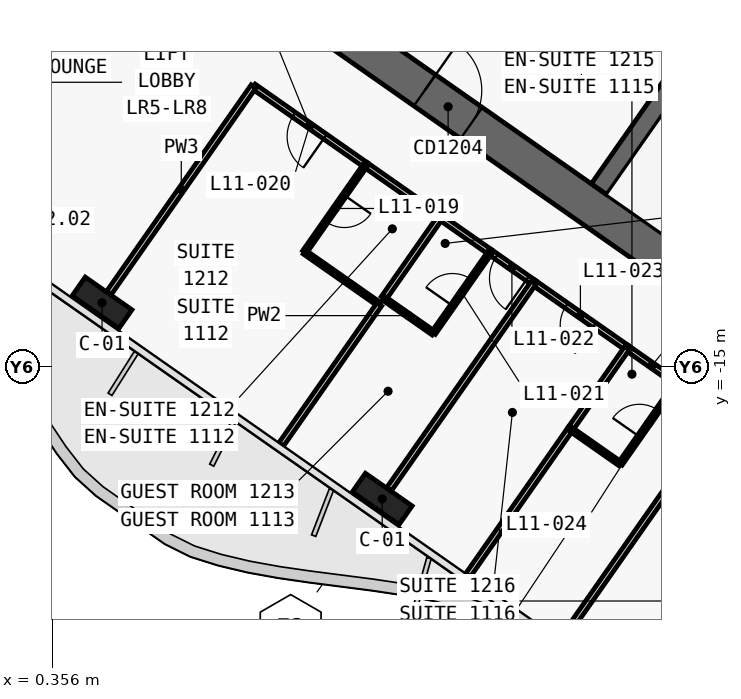
"""IFC4 building model, lengths in metres.
Left out: names, types, materials, properties, quantities, classifications, styles, units other than length and angle.
Written with IfcOpenShell. Run it as: python <this file> out.ifc"""

import sys

from ifc_helpers import new_model, si_unit, direction, frame, frame_2d, origin, origin_2d, place, context, subcontext, project, spatial, polyline, rectangle, outline, extrude, element, fill, save


model = new_model("IFC4")
c1 = context("Model", 3, precision=1e-05, world=origin(), true_north=direction((0.0, 1.0)))
c2 = subcontext(c1, "Body", "Model", "MODEL_VIEW")
j1 = project(units=[si_unit("LENGTHUNIT", "METRE"), si_unit("PLANEANGLEUNIT", "RADIAN")], contexts=[c1])
p1 = place(None, origin())
s1 = spatial("IfcSite", under=j1, at=p1, CompositionType="ELEMENT")
p2 = place(p1, origin())
s2 = spatial("IfcBuilding", under=s1, at=p2, CompositionType="ELEMENT")
p3 = place(p2, frame((0.0, 0.0, 65.3)))
s3 = spatial("IfcBuildingStorey", under=s2, at=p3, CompositionType="ELEMENT", Elevation=65.3)
p4 = place(p3, frame((-0.037, 11.867, 0.0), z_axis=(0.0, 0.0, 1.0), x_axis=(0.819155306259, -0.573571777746, 0.0)))
e1 = element("IfcWall", 1, at=p4, inside=s3, PredefinedType="SHEAR", context=c2, shape_type="SweptSolid", body=[
    extrude(outline(polyline([(33.837, 0.5), (0.0, 0.5), (0.7, -0.5), (33.837, -0.5), (33.837, 0.5)])), origin(), (0.0, 0.0, 1.0), 3.6),
])
p5 = place(p3, frame((-0.037, -0.585, 0.0), z_axis=(0.0, 0.0, 1.0), x_axis=(0.819157152511, -0.573569140985, 0.0)))
e2 = element("IfcWall", 2, at=p5, inside=s3, PredefinedType="SHEAR", context=c2, shape_type="SweptSolid", body=[
    extrude(outline(polyline([(26.695, 0.5), (0.0, 0.5), (0.7, -0.5), (26.695, -0.5), (26.695, 0.5)])), origin(), (0.0, 0.0, 1.0), 3.6),
])
p6 = place(p5, frame((1.245, 0.0, 0.0)))
e3 = element("IfcOpeningElement", 3, at=p6, cuts=e2, PredefinedType="OPENING", context=c2, shape_type="SweptSolid", body=[
    extrude(rectangle(XDim=1.5, YDim=2.1, at=frame_2d((0.75, 1.05))), frame((0.0, 0.51, 0.0), z_axis=(0.0, -1.0, 0.0), x_axis=(1.0, 0.0, 0.0)), (0.0, 0.0, 1.0), 1.02),
])
p7 = place(p5, frame((12.445, 0.0, 0.0)))
e4 = element("IfcOpeningElement", 4, at=p7, cuts=e2, PredefinedType="OPENING", context=c2, shape_type="SweptSolid", body=[
    extrude(rectangle(XDim=1.5, YDim=2.1, at=frame_2d((0.75, 1.05))), frame((0.0, 0.51, 0.0), z_axis=(0.0, -1.0, 0.0), x_axis=(1.0, 0.0, 0.0)), (0.0, 0.0, 1.0), 1.02),
])
p8 = place(p3, frame((14.745, -10.324, 0.0), z_axis=(0.0, 0.0, 1.0), x_axis=(0.57356780395, 0.819158088694, 0.0)))
e5 = element("IfcWall", 5, at=p8, inside=s3, PredefinedType="SHEAR", context=c2, shape_type="SweptSolid", body=[
    extrude(outline(polyline([(0.0, 0.25), (0.0, -0.25), (4.35, -0.25), (4.35, 0.25), (0.0, 0.25)])), origin(), (0.0, 0.0, 1.0), 3.6),
])
p9 = place(p3, frame((2.638, 3.768, 0.0), z_axis=(0.0, 0.0, 1.0), x_axis=(0.819148977158, -0.573580816643, 0.0)))
e6 = element("IfcWall", 6, at=p9, inside=s3, PredefinedType="SHEAR", context=c2, shape_type="SweptSolid", body=[
    extrude(outline(polyline([(0.0, 0.25), (0.0, -0.25), (26.0, -0.25), (26.0, 0.25), (0.0, 0.25)])), origin(), (0.0, 0.0, 1.0), 3.6),
])
p10 = place(p9, frame((9.637, 0.0, 0.0)))
e7 = element("IfcOpeningElement", 7, at=p10, cuts=e6, PredefinedType="OPENING", context=c2, shape_type="SweptSolid", body=[
    extrude(rectangle(XDim=1.2, YDim=2.1, at=frame_2d((0.6, 1.05))), frame((0.0, 0.26, 0.0), z_axis=(0.0, -1.0, 0.0), x_axis=(1.0, 0.0, 0.0)), (0.0, 0.0, 1.0), 0.52),
])
p11 = place(p9, frame((11.812, 0.0, 0.0)))
e8 = element("IfcOpeningElement", 8, at=p11, cuts=e6, PredefinedType="OPENING", context=c2, shape_type="SweptSolid", body=[
    extrude(rectangle(XDim=1.2, YDim=2.1, at=frame_2d((0.6, 1.05))), frame((0.0, 0.26, 0.0), z_axis=(0.0, -1.0, 0.0), x_axis=(1.0, 0.0, 0.0)), (0.0, 0.0, 1.0), 0.52),
])
p12 = place(p9, frame((13.988, 0.0, 0.0)))
e9 = element("IfcOpeningElement", 9, at=p12, cuts=e6, PredefinedType="OPENING", context=c2, shape_type="SweptSolid", body=[
    extrude(rectangle(XDim=1.2, YDim=2.1, at=frame_2d((0.6, 1.05))), frame((0.0, 0.26, 0.0), z_axis=(0.0, -1.0, 0.0), x_axis=(1.0, 0.0, 0.0)), (0.0, 0.0, 1.0), 0.52),
])
p13 = place(p9, frame((16.262, 0.0, 0.0)))
e10 = element("IfcOpeningElement", 10, at=p13, cuts=e6, PredefinedType="OPENING", context=c2, shape_type="SweptSolid", body=[
    extrude(rectangle(XDim=1.0, YDim=2.1, at=frame_2d((0.5, 1.05))), frame((0.0, 0.26, 0.0), z_axis=(0.0, -1.0, 0.0), x_axis=(1.0, 0.0, 0.0)), (0.0, 0.0, 1.0), 0.52),
])
for number, where, z_axis, x_axis in (
    (11, (1.665, -13.313, 0.0), (0.0, 0.0, 1.0), (0.819, -0.574, 0.0)),
    (12, (9.038, -18.475, 0.0), (0.0, 0.0, 1.0), (0.819, -0.574, 0.0)),
):
    element("IfcColumn", number, at=place(p3, frame(where, z_axis=z_axis, x_axis=x_axis)), inside=s3, PredefinedType="COLUMN", context=c2, shape_type="SweptSolid", body=[
        extrude(rectangle(XDim=1.5, YDim=0.6, at=origin_2d()), origin(), (0.0, 0.0, 1.0), 3.6),
    ])
p14 = place(p3, frame((8.601, -9.685, 0.0), z_axis=(0.0, 0.0, 1.0), x_axis=(-0.819149096931, 0.573580645591, 0.0)))
e13 = element("IfcWall", 13, at=p14, inside=s3, PredefinedType="PARTITIONING", context=c2, shape_type="SweptSolid", body=[
    extrude(rectangle(XDim=3.601, YDim=0.15, at=frame_2d((1.8, 0.0))), origin(), (0.0, 0.0, 1.0), 2.6),
])
p15 = place(p14, frame((1.301, 0.0, 0.0)))
e14 = element("IfcOpeningElement", 14, at=p15, cuts=e13, PredefinedType="OPENING", context=c2, shape_type="SweptSolid", body=[
    extrude(rectangle(XDim=1.0, YDim=2.1, at=frame_2d((0.5, 1.05))), frame((0.0, 0.085, 0.0), z_axis=(0.0, -1.0, 0.0), x_axis=(1.0, 0.0, 0.0)), (0.0, 0.0, 1.0), 0.17),
])
p16 = place(p3, frame((10.568, -11.062, 0.0), z_axis=(0.0, 0.0, 1.0), x_axis=(-0.819146032251, 0.573585022335, 0.0)))
e15 = element("IfcWall", 15, at=p16, inside=s3, PredefinedType="PARTITIONING", context=c2, shape_type="SweptSolid", body=[
    extrude(rectangle(XDim=2.404, YDim=0.15, at=frame_2d((1.202, 0.0))), origin(), (0.0, 0.0, 1.0), 3.32),
])
p17 = place(p3, frame((13.026, -12.783, 0.0), z_axis=(0.0, 0.0, 1.0), x_axis=(-0.81914197737, 0.573590813132, 0.0)))
e16 = element("IfcWall", 16, at=p17, inside=s3, PredefinedType="PARTITIONING", context=c2, shape_type="SweptSolid", body=[
    extrude(rectangle(XDim=1.403, YDim=0.15, at=frame_2d((0.701, 0.0))), origin(), (0.0, 0.0, 1.0), 2.6),
])
p18 = place(p17, frame((0.202, 0.0, 0.0)))
e17 = element("IfcOpeningElement", 17, at=p18, cuts=e16, PredefinedType="OPENING", context=c2, shape_type="SweptSolid", body=[
    extrude(rectangle(XDim=1.0, YDim=2.1, at=frame_2d((0.5, 1.05))), frame((0.0, 0.085, 0.0), z_axis=(0.0, -1.0, 0.0), x_axis=(1.0, 0.0, 0.0)), (0.0, 0.0, 1.0), 0.17),
])
p19 = place(p3, frame((11.879, -11.98, 0.0), z_axis=(0.0, 0.0, 1.0), x_axis=(-0.819189013667, 0.573523634986, 0.0)))
e18 = element("IfcWall", 18, at=p19, inside=s3, PredefinedType="PARTITIONING", context=c2, shape_type="SweptSolid", body=[
    extrude(rectangle(XDim=1.604, YDim=0.15, at=frame_2d((0.802, 0.0))), origin(), (0.0, 0.0, 1.0), 3.32),
])
p20 = place(p3, frame((15.483, -14.504, 0.0), z_axis=(0.0, 0.0, 1.0), x_axis=(-0.81916700466, 0.573555070134, 0.0)))
e19 = element("IfcWall", 19, at=p20, inside=s3, PredefinedType="PARTITIONING", context=c2, shape_type="SweptSolid", body=[
    extrude(rectangle(XDim=3.004, YDim=0.15, at=frame_2d((1.502, 0.0))), origin(), (0.0, 0.0, 1.0), 2.6),
])
p21 = place(p20, frame((1.052, 0.0, 0.0)))
e20 = element("IfcOpeningElement", 20, at=p21, cuts=e19, PredefinedType="OPENING", context=c2, shape_type="SweptSolid", body=[
    extrude(rectangle(XDim=0.9, YDim=2.1, at=frame_2d((0.45, 1.05))), frame((0.0, 0.085, 0.0), z_axis=(0.0, -1.0, 0.0), x_axis=(1.0, 0.0, 0.0)), (0.0, 0.0, 1.0), 0.17),
])
p22 = place(p3, frame((16.794, -15.421, 0.0), z_axis=(0.0, 0.0, 1.0), x_axis=(-0.819189013667, 0.573523634986, 0.0)))
e21 = element("IfcWall", 21, at=p22, inside=s3, PredefinedType="PARTITIONING", context=c2, shape_type="SweptSolid", body=[
    extrude(rectangle(XDim=1.604, YDim=0.15, at=frame_2d((0.802, 0.0))), origin(), (0.0, 0.0, 1.0), 3.32),
])
p23 = place(p3, frame((8.6, -9.684, 0.0), z_axis=(0.0, 0.0, 1.0), x_axis=(-0.573550118428, -0.819170471667, 0.0)))
e22 = element("IfcWall", 22, at=p23, inside=s3, PredefinedType="PARTITIONING", context=c2, shape_type="SweptSolid", body=[
    extrude(rectangle(XDim=2.8, YDim=0.12, at=frame_2d((1.4, 0.0))), origin(), (0.0, 0.0, 1.0), 3.32),
])
p24 = place(p23, frame((0.975, 0.0, 0.0)))
e23 = element("IfcOpeningElement", 23, at=p24, cuts=e22, PredefinedType="OPENING", context=c2, shape_type="SweptSolid", body=[
    extrude(rectangle(XDim=0.85, YDim=2.05, at=frame_2d((0.425, 1.025))), frame((0.0, 0.07, 0.0), z_axis=(0.0, -1.0, 0.0), x_axis=(1.0, 0.0, 0.0)), (0.0, 0.0, 1.0), 0.14),
])
p25 = place(p3, frame((6.994, -11.979, 0.0), z_axis=(0.0, 0.0, 1.0), x_axis=(0.819188907105, -0.573523787192, 0.0)))
e24 = element("IfcWall", 24, at=p25, inside=s3, PredefinedType="PARTITIONING", context=c2, shape_type="SweptSolid", body=[
    extrude(rectangle(XDim=2.4, YDim=0.12, at=frame_2d((1.2, 0.0))), origin(), (0.0, 0.0, 1.0), 3.32),
])
p26 = place(p3, frame((8.96, -13.355, 0.0), z_axis=(0.0, 0.0, 1.0), x_axis=(-0.573564311442, -0.819160534108, 0.0)))
e25 = element("IfcWall", 25, at=p26, inside=s3, PredefinedType="PARTITIONING", context=c2, shape_type="SweptSolid", body=[
    extrude(rectangle(XDim=4.499, YDim=0.15, at=frame_2d((2.25, 0.0))), origin(), (0.0, 0.0, 1.0), 2.5),
])
p27 = place(p3, frame((1.849, -13.051, 0.0), z_axis=(0.0, 0.0, 1.0), x_axis=(0.57357355307, 0.819154063177, 0.0)))
e26 = element("IfcWall", 26, at=p27, inside=s3, PredefinedType="PARTITIONING", context=c2, shape_type="SweptSolid", body=[
    extrude(rectangle(XDim=6.63, YDim=0.15, at=frame_2d((3.315, 0.0))), origin(), (0.0, 0.0, 1.0), 2.6),
])
p28 = place(p3, frame((10.567, -11.061, 0.0), z_axis=(0.0, 0.0, 1.0), x_axis=(-0.573588285102, -0.819143747577, 0.0)))
e27 = element("IfcWall", 27, at=p28, inside=s3, PredefinedType="PARTITIONING", context=c2, shape_type="SweptSolid", body=[
    extrude(rectangle(XDim=2.602, YDim=0.15, at=frame_2d((1.301, 0.0))), origin(), (0.0, 0.0, 1.0), 3.32),
])
p29 = place(p3, frame((9.075, -13.192, 0.0), z_axis=(0.0, 0.0, 1.0), x_axis=(0.819131543282, -0.57360571371, 0.0)))
e28 = element("IfcWall", 28, at=p29, inside=s3, PredefinedType="PARTITIONING", context=c2, shape_type="SweptSolid", body=[
    extrude(rectangle(XDim=1.6, YDim=0.12, at=frame_2d((0.8, 0.0))), origin(), (0.0, 0.0, 1.0), 3.32),
])
p30 = place(p3, frame((10.387, -14.109, 0.0), z_axis=(0.0, 0.0, 1.0), x_axis=(0.573582085028, 0.819148089014, 0.0)))
e29 = element("IfcWall", 29, at=p30, inside=s3, PredefinedType="PARTITIONING", context=c2, shape_type="SweptSolid", body=[
    extrude(rectangle(XDim=2.6, YDim=0.12, at=frame_2d((1.3, 0.0))), origin(), (0.0, 0.0, 1.0), 3.32),
])
p31 = place(p30, frame((0.875, 0.0, 0.0)))
e30 = element("IfcOpeningElement", 30, at=p31, cuts=e29, PredefinedType="OPENING", context=c2, shape_type="SweptSolid", body=[
    extrude(rectangle(XDim=0.85, YDim=2.05, at=frame_2d((0.425, 1.025))), frame((0.0, 0.07, 0.0), z_axis=(0.0, -1.0, 0.0), x_axis=(1.0, 0.0, 0.0)), (0.0, 0.0, 1.0), 0.14),
])
p32 = place(p3, frame((13.024, -12.782, 0.0), z_axis=(0.0, 0.0, 1.0), x_axis=(-0.573556251799, -0.819166177294, 0.0)))
e31 = element("IfcWall", 31, at=p32, inside=s3, PredefinedType="PARTITIONING", context=c2, shape_type="SweptSolid", body=[
    extrude(rectangle(XDim=6.63, YDim=0.15, at=frame_2d((3.315, 0.0))), origin(), (0.0, 0.0, 1.0), 2.6),
])
p33 = place(p3, frame((13.991, -16.632, 0.0), z_axis=(0.0, 0.0, 1.0), x_axis=(-0.573563420358, -0.819161158032, 0.0)))
e32 = element("IfcWall", 32, at=p33, inside=s3, PredefinedType="PARTITIONING", context=c2, shape_type="SweptSolid", body=[
    extrude(rectangle(XDim=4.701, YDim=0.15, at=frame_2d((2.351, 0.0))), origin(), (0.0, 0.0, 1.0), 2.5),
])
p34 = place(p3, frame((15.481, -14.503, 0.0), z_axis=(0.0, 0.0, 1.0), x_axis=(-0.573588285102, -0.819143747577, 0.0)))
e33 = element("IfcWall", 33, at=p34, inside=s3, PredefinedType="PARTITIONING", context=c2, shape_type="SweptSolid", body=[
    extrude(rectangle(XDim=2.602, YDim=0.15, at=frame_2d((1.301, 0.0))), origin(), (0.0, 0.0, 1.0), 3.32),
])
p35 = place(p3, frame((13.99, -16.633, 0.0), z_axis=(0.0, 0.0, 1.0), x_axis=(0.819253425856, -0.573431621227, 0.0)))
e34 = element("IfcWall", 34, at=p35, inside=s3, PredefinedType="PARTITIONING", context=c2, shape_type="SweptSolid", body=[
    extrude(rectangle(XDim=1.6, YDim=0.12, at=frame_2d((0.8, 0.0))), origin(), (0.0, 0.0, 1.0), 3.32),
])
p36 = place(p3, frame((15.302, -17.551, 0.0), z_axis=(0.0, 0.0, 1.0), x_axis=(0.573600972199, 0.819134863556, 0.0)))
e35 = element("IfcWall", 35, at=p36, inside=s3, PredefinedType="PARTITIONING", context=c2, shape_type="SweptSolid", body=[
    extrude(rectangle(XDim=2.6, YDim=0.12, at=frame_2d((1.3, 0.0))), origin(), (0.0, 0.0, 1.0), 3.32),
])
p37 = place(p36, frame((0.875, 0.0, 0.0)))
e36 = element("IfcOpeningElement", 36, at=p37, cuts=e35, PredefinedType="OPENING", context=c2, shape_type="SweptSolid", body=[
    extrude(rectangle(XDim=0.85, YDim=2.05, at=frame_2d((0.425, 1.025))), frame((0.0, 0.07, 0.0), z_axis=(0.0, -1.0, 0.0), x_axis=(1.0, 0.0, 0.0)), (0.0, 0.0, 1.0), 0.14),
])
p38 = place(p3, frame((17.939, -16.223, 0.0), z_axis=(0.0, 0.0, 1.0), x_axis=(-0.573594765376, -0.819139209862, 0.0)))
e37 = element("IfcWall", 37, at=p38, inside=s3, PredefinedType="PARTITIONING", context=c2, shape_type="SweptSolid", body=[
    extrude(rectangle(XDim=7.3, YDim=0.15, at=frame_2d((3.65, 0.0))), origin(), (0.0, 0.0, 1.0), 2.5),
])
p39 = place(p7, origin())
e38 = element("IfcDoor", 38, at=p39, inside=s3, OperationType="DOUBLE_DOOR_SINGLE_SWING", PredefinedType="DOOR", context=c2, shape_type="SweptSolid", body=[
    extrude(rectangle(XDim=1.5, YDim=2.1, at=frame_2d((0.75, 1.05))), frame((0.0, 0.025, 0.0), z_axis=(0.0, -1.0, 0.0), x_axis=(1.0, 0.0, 0.0)), (0.0, 0.0, 1.0), 0.05),
])
fill(e4, e38)
p40 = place(p24, origin())
e39 = element("IfcDoor", 39, at=p40, inside=s3, OperationType="SINGLE_SWING_LEFT", PredefinedType="DOOR", context=c2, shape_type="SweptSolid", body=[
    extrude(rectangle(XDim=0.85, YDim=2.05, at=frame_2d((0.425, 1.025))), frame((0.0, 0.025, 0.0), z_axis=(0.0, -1.0, 0.0), x_axis=(1.0, 0.0, 0.0)), (0.0, 0.0, 1.0), 0.05),
])
fill(e23, e39)
p41 = place(p15, origin())
e40 = element("IfcDoor", 40, at=p41, inside=s3, OperationType="SINGLE_SWING_RIGHT", PredefinedType="DOOR", context=c2, shape_type="SweptSolid", body=[
    extrude(rectangle(XDim=1.0, YDim=2.1, at=frame_2d((0.5, 1.05))), frame((0.0, 0.025, 0.0), z_axis=(0.0, -1.0, 0.0), x_axis=(1.0, 0.0, 0.0)), (0.0, 0.0, 1.0), 0.05),
])
fill(e14, e40)
p42 = place(p31, origin())
e41 = element("IfcDoor", 41, at=p42, inside=s3, OperationType="SINGLE_SWING_RIGHT", PredefinedType="DOOR", context=c2, shape_type="SweptSolid", body=[
    extrude(rectangle(XDim=0.85, YDim=2.05, at=frame_2d((0.425, 1.025))), frame((0.0, 0.025, 0.0), z_axis=(0.0, -1.0, 0.0), x_axis=(1.0, 0.0, 0.0)), (0.0, 0.0, 1.0), 0.05),
])
fill(e30, e41)
p43 = place(p18, origin())
e42 = element("IfcDoor", 42, at=p43, inside=s3, OperationType="SINGLE_SWING_LEFT", PredefinedType="DOOR", context=c2, shape_type="SweptSolid", body=[
    extrude(rectangle(XDim=1.0, YDim=2.1, at=frame_2d((0.5, 1.05))), frame((0.0, 0.025, 0.0), z_axis=(0.0, -1.0, 0.0), x_axis=(1.0, 0.0, 0.0)), (0.0, 0.0, 1.0), 0.05),
])
fill(e17, e42)
p44 = place(p21, origin())
e43 = element("IfcDoor", 43, at=p44, inside=s3, OperationType="SINGLE_SWING_RIGHT", PredefinedType="DOOR", context=c2, shape_type="SweptSolid", body=[
    extrude(rectangle(XDim=0.9, YDim=2.1, at=frame_2d((0.45, 1.05))), frame((0.0, 0.025, 0.0), z_axis=(0.0, -1.0, 0.0), x_axis=(1.0, 0.0, 0.0)), (0.0, 0.0, 1.0), 0.05),
])
fill(e20, e43)
p45 = place(p37, origin())
e44 = element("IfcDoor", 44, at=p45, inside=s3, OperationType="SINGLE_SWING_LEFT", PredefinedType="DOOR", context=c2, shape_type="SweptSolid", body=[
    extrude(rectangle(XDim=0.85, YDim=2.05, at=frame_2d((0.425, 1.025))), frame((0.0, 0.025, 0.0), z_axis=(0.0, -1.0, 0.0), x_axis=(1.0, 0.0, 0.0)), (0.0, 0.0, 1.0), 0.05),
])
fill(e36, e44)
save(model, sys.argv[1])
